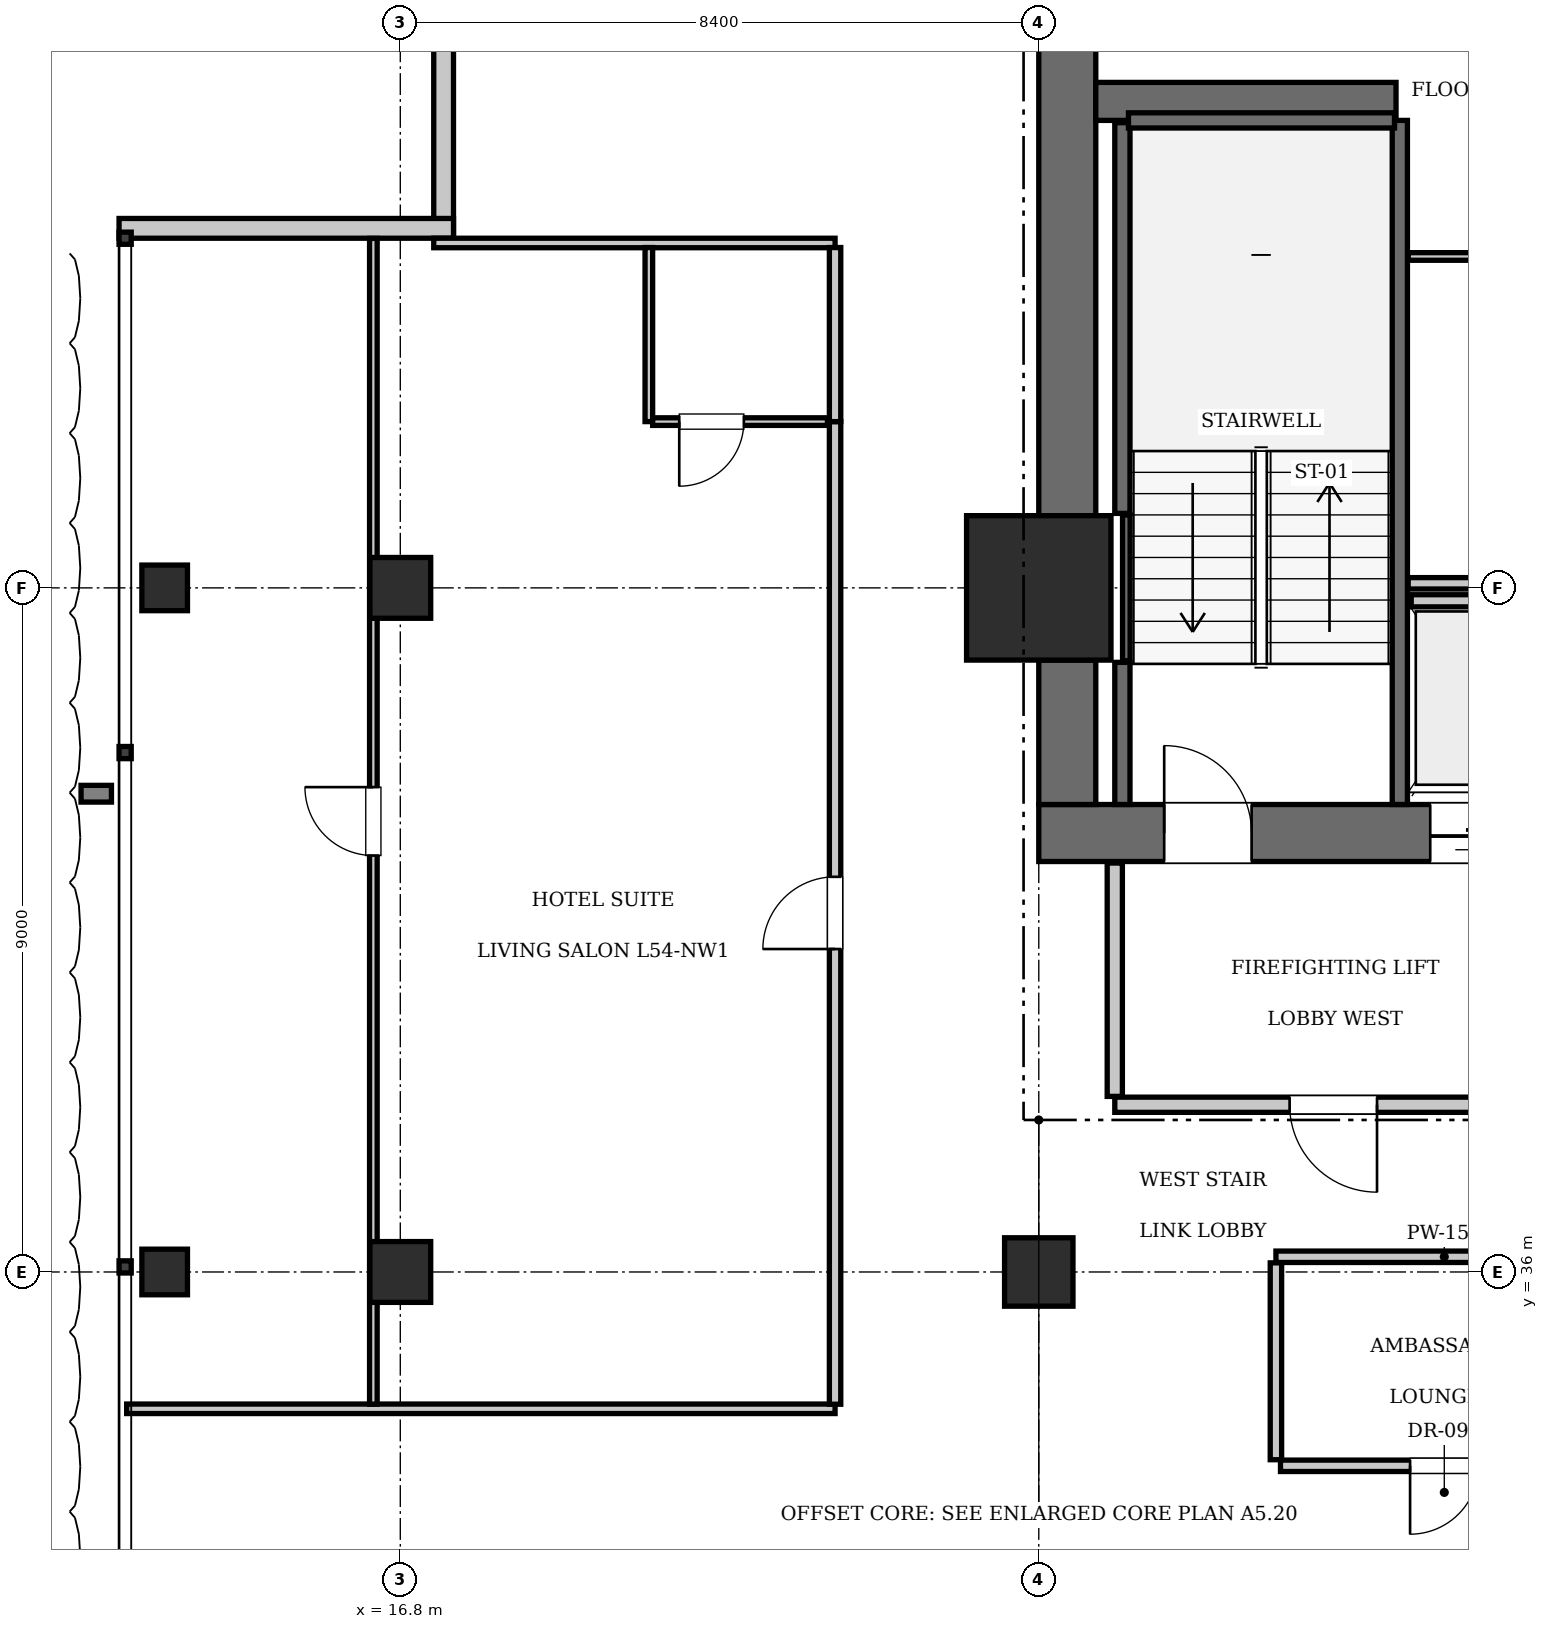
"""IFC4 building model, lengths in metres.
Left out: names, types, materials, properties, quantities, classifications, styles, units other than length and angle.
Written with IfcOpenShell. Run it as: python <this file> out.ifc"""

import sys

from ifc_helpers import new_model, si_unit, direction, frame, frame_2d, origin, origin_2d, place, context, subcontext, project, spatial, rectangle, i_section, extrude, element, fill, save


model = new_model("IFC4")
c1 = context("Model", 3, precision=1e-05, world=origin(), true_north=direction((0.0, 1.0)))
c2 = subcontext(c1, "Body", "Model", "MODEL_VIEW")
j1 = project(units=[si_unit("LENGTHUNIT", "METRE"), si_unit("PLANEANGLEUNIT", "RADIAN")], contexts=[c1])
p1 = place(None, origin())
s1 = spatial("IfcSite", under=j1, at=p1, CompositionType="ELEMENT")
p2 = place(p1, origin())
s2 = spatial("IfcBuilding", under=s1, at=p2, CompositionType="ELEMENT")
p3 = place(p2, frame((0.0, 0.0, 219.8)))
s3 = spatial("IfcBuildingStorey", under=s2, at=p3, CompositionType="ELEMENT", Elevation=219.8)
p4 = place(p3, frame((25.2, 45.0, 0.0), z_axis=(0.0, 0.0, 1.0), x_axis=(1.0, 0.0, 0.0)))
e1 = element("IfcColumn", 1, at=p4, inside=s3, PredefinedType="COLUMN", context=c2, shape_type="SweptSolid", body=[
    extrude(rectangle(XDim=1.9, YDim=1.9, at=origin_2d()), origin(), (0.0, 0.0, 1.0), 3.85),
])
p5 = place(p3, frame((25.2, 41.775, 0.0), z_axis=(0.0, 0.0, 1.0), x_axis=(1.0, 0.0, 0.0)))
e2 = element("IfcWall", 2, at=p5, inside=s3, PredefinedType="SHEAR", context=c2, shape_type="SweptSolid", body=[
    extrude(rectangle(XDim=6.8, YDim=0.75, at=frame_2d((3.4, 0.0))), origin(), (0.0, 0.0, 1.0), 3.85),
])
p6 = place(p5, frame((1.65, 0.0, 0.0)))
e3 = element("IfcOpeningElement", 3, at=p6, cuts=e2, PredefinedType="OPENING", context=c2, shape_type="SweptSolid", body=[
    extrude(rectangle(XDim=1.15, YDim=2.15, at=frame_2d((0.575, 1.075))), frame((0.0, 0.385, 0.0), z_axis=(0.0, -1.0, 0.0), x_axis=(1.0, 0.0, 0.0)), (0.0, 0.0, 1.0), 0.77),
])
p7 = place(p5, frame((5.15, 0.0, 0.0)))
e4 = element("IfcOpeningElement", 4, at=p7, cuts=e2, PredefinedType="OPENING", context=c2, shape_type="SweptSolid", body=[
    extrude(rectangle(XDim=1.1, YDim=2.2, at=frame_2d((0.55, 1.1))), frame((0.0, 0.385, 0.0), z_axis=(0.0, -1.0, 0.0), x_axis=(1.0, 0.0, 0.0)), (0.0, 0.0, 1.0), 0.77),
])
p8 = place(p3, frame((25.575, 42.15, 0.0), z_axis=(0.0, 0.0, 1.0), x_axis=(0.0, 1.0, 0.0)))
e5 = element("IfcWall", 5, at=p8, inside=s3, PredefinedType="SHEAR", context=c2, shape_type="SweptSolid", body=[
    extrude(rectangle(XDim=1.9, YDim=0.75, at=frame_2d((0.95, 0.0))), origin(), (0.0, 0.0, 1.0), 3.85),
])
p9 = place(p3, frame((25.575, 45.95, 0.0), z_axis=(0.0, 0.0, 1.0), x_axis=(0.0, 1.0, 0.0)))
e6 = element("IfcWall", 6, at=p9, inside=s3, PredefinedType="SHEAR", context=c2, shape_type="SweptSolid", body=[
    extrude(rectangle(XDim=7.3, YDim=0.75, at=frame_2d((3.65, 0.0))), origin(), (0.0, 0.0, 1.0), 3.85),
])
p10 = place(p3, frame((25.95, 51.4, 0.0), z_axis=(0.0, 0.0, 1.0), x_axis=(1.0, 0.0, 0.0)))
e7 = element("IfcWall", 7, at=p10, inside=s3, PredefinedType="SHEAR", context=c2, shape_type="SweptSolid", body=[
    extrude(rectangle(XDim=3.95, YDim=0.5, at=frame_2d((1.975, 0.0))), origin(), (0.0, 0.0, 1.0), 3.85),
])
p11 = place(p3, frame((25.2, 36.0, 0.0), z_axis=(0.0, 0.0, 1.0), x_axis=(1.0, 0.0, 0.0)))
e8 = element("IfcColumn", 8, at=p11, inside=s3, PredefinedType="COLUMN", context=c2, shape_type="SweptSolid", body=[
    extrude(rectangle(XDim=0.9, YDim=0.9, at=origin_2d()), origin(), (0.0, 0.0, 1.0), 3.85),
])
for number, where, z_axis, x_axis in (
    (9, (16.8, 36.0, 0.0), (0.0, 0.0, 1.0), (1.0, 0.0, 0.0)),
    (10, (16.8, 45.0, 0.0), (0.0, 0.0, 1.0), (1.0, 0.0, 0.0)),
):
    element("IfcColumn", number, at=place(p3, frame(where, z_axis=z_axis, x_axis=x_axis)), inside=s3, PredefinedType="COLUMN", context=c2, shape_type="SweptSolid", body=[
        extrude(rectangle(XDim=0.8, YDim=0.8, at=origin_2d()), origin(), (0.0, 0.0, 1.0), 3.85),
    ])
for number, where, z_axis, x_axis in (
    (11, (13.7, 36.0, 0.0), (0.0, 0.0, 1.0), (1.0, 0.0, 0.0)),
    (12, (13.7, 45.0, 0.0), (0.0, 0.0, 1.0), (1.0, 0.0, 0.0)),
):
    element("IfcColumn", number, at=place(p3, frame(where, z_axis=z_axis, x_axis=x_axis)), inside=s3, PredefinedType="COLUMN", context=c2, shape_type="SweptSolid", body=[
        extrude(i_section(OverallWidth=0.6, OverallDepth=0.6, WebThickness=0.025, FlangeThickness=0.038, at=origin_2d()), origin(), (0.0, 0.0, 1.0), 3.85),
    ])
p12 = place(p3, frame((29.95, 42.15, 0.0), z_axis=(0.0, 0.0, 1.0), x_axis=(0.0, 1.0, 0.0)))
e13 = element("IfcWall", 13, at=p12, inside=s3, PredefinedType="SOLIDWALL", context=c2, shape_type="SweptSolid", body=[
    extrude(rectangle(XDim=9.0, YDim=0.2, at=frame_2d((4.5, 0.0))), origin(), (0.0, 0.0, 1.0), 3.61),
])
p13 = place(p3, frame((26.3, 42.15, 0.0), z_axis=(0.0, 0.0, 1.0), x_axis=(0.0, 1.0, 0.0)))
e14 = element("IfcWall", 14, at=p13, inside=s3, PredefinedType="SOLIDWALL", context=c2, shape_type="SweptSolid", body=[
    extrude(rectangle(XDim=1.87, YDim=0.2, at=frame_2d((0.935, 0.0))), origin(), (0.0, 0.0, 1.0), 3.61),
])
p14 = place(p3, frame((26.3, 45.98, 0.0), z_axis=(0.0, 0.0, 1.0), x_axis=(0.0, 1.0, 0.0)))
e15 = element("IfcWall", 15, at=p14, inside=s3, PredefinedType="SOLIDWALL", context=c2, shape_type="SweptSolid", body=[
    extrude(rectangle(XDim=5.14, YDim=0.2, at=frame_2d((2.57, 0.0))), origin(), (0.0, 0.0, 1.0), 3.61),
])
p15 = place(p3, frame((26.38, 51.15, 0.0), z_axis=(0.0, 0.0, 1.0), x_axis=(1.0, 0.0, 0.0)))
e16 = element("IfcWall", 16, at=p15, inside=s3, PredefinedType="SOLIDWALL", context=c2, shape_type="SweptSolid", body=[
    extrude(rectangle(XDim=3.5, YDim=0.2, at=frame_2d((1.75, 0.0))), origin(), (0.0, 0.0, 1.0), 3.61),
])
p16 = place(p3, frame((26.352, 44.04, 0.0), z_axis=(0.0, 0.0, 1.0), x_axis=(0.0, 1.0, 0.0)))
e17 = element("IfcWall", 17, at=p16, inside=s3, PredefinedType="SOLIDWALL", context=c2, shape_type="SweptSolid", body=[
    extrude(rectangle(XDim=1.92, YDim=0.1, at=frame_2d((0.96, 0.0))), origin(), (0.0, 0.0, 1.0), 3.61),
])
p17 = place(p3, frame((30.1, 44.83, 0.0), z_axis=(0.0, 0.0, 1.0), x_axis=(1.0, 0.0, 0.0)))
e18 = element("IfcWall", 18, at=p17, inside=s3, PredefinedType="SOLIDWALL", context=c2, shape_type="SweptSolid", body=[
    extrude(rectangle(XDim=1.6, YDim=0.16, at=frame_2d((0.8, 0.0))), origin(), (0.0, 0.0, 1.0), 3.61),
])
for number, where, z_axis, x_axis in (
    (19, (17.37, 49.6, 0.0), (0.0, 0.0, 1.0), (0.0, 1.0, 0.0)),
    (20, (13.1, 49.73, 0.0), (0.0, 0.0, 1.0), (1.0, 0.0, 0.0)),
):
    element("IfcWall", number, at=place(p3, frame(where, z_axis=z_axis, x_axis=x_axis)), inside=s3, PredefinedType="SOLIDWALL", context=c2, shape_type="SweptSolid", body=[
        extrude(rectangle(XDim=4.4, YDim=0.26, at=frame_2d((2.2, 0.0))), origin(), (0.0, 0.0, 1.0), 3.61),
    ])
p18 = place(p3, frame((26.2, 38.2, 0.0), z_axis=(0.0, 0.0, 1.0), x_axis=(1.0, 0.0, 0.0)))
e21 = element("IfcWall", 21, at=p18, inside=s3, PredefinedType="PARTITIONING", context=c2, shape_type="SweptSolid", body=[
    extrude(rectangle(XDim=5.8, YDim=0.2, at=frame_2d((2.9, 0.0))), origin(), (0.0, 0.0, 1.0), 3.61),
])
p19 = place(p18, frame((2.3, 0.0, 0.0)))
e22 = element("IfcOpeningElement", 22, at=p19, cuts=e21, PredefinedType="OPENING", context=c2, shape_type="SweptSolid", body=[
    extrude(rectangle(XDim=1.15, YDim=2.15, at=frame_2d((0.575, 1.075))), frame((0.0, 0.11, 0.0), z_axis=(0.0, -1.0, 0.0), x_axis=(1.0, 0.0, 0.0)), (0.0, 0.0, 1.0), 0.22),
])
p20 = place(p3, frame((26.2, 38.31, 0.0), z_axis=(0.0, 0.0, 1.0), x_axis=(0.0, 1.0, 0.0)))
e23 = element("IfcWall", 23, at=p20, inside=s3, PredefinedType="PARTITIONING", context=c2, shape_type="SweptSolid", body=[
    extrude(rectangle(XDim=3.07, YDim=0.2, at=frame_2d((1.535, 0.0))), origin(), (0.0, 0.0, 1.0), 3.61),
])
p21 = place(p3, frame((30.06, 45.06, 0.0), z_axis=(0.0, 0.0, 1.0), x_axis=(1.0, 0.0, 0.0)))
e24 = element("IfcWall", 24, at=p21, inside=s3, PredefinedType="PARTITIONING", context=c2, shape_type="SweptSolid", body=[
    extrude(rectangle(XDim=3.18, YDim=0.15, at=frame_2d((1.59, 0.0))), origin(), (0.0, 0.0, 1.0), 3.61),
])
p22 = place(p3, frame((30.06, 49.36, 0.0), z_axis=(0.0, 0.0, 1.0), x_axis=(1.0, 0.0, 0.0)))
e25 = element("IfcWall", 25, at=p22, inside=s3, PredefinedType="PARTITIONING", context=c2, shape_type="SweptSolid", body=[
    extrude(rectangle(XDim=3.18, YDim=0.1, at=frame_2d((1.59, 0.0))), origin(), (0.0, 0.0, 1.0), 3.61),
])
p23 = place(p22, frame((1.95, 0.0, 0.0)))
e26 = element("IfcOpeningElement", 26, at=p23, cuts=e25, PredefinedType="OPENING", context=c2, shape_type="SweptSolid", body=[
    extrude(rectangle(XDim=0.8, YDim=2.05, at=frame_2d((0.4, 1.025))), frame((0.0, 0.06, 0.0), z_axis=(0.0, -1.0, 0.0), x_axis=(1.0, 0.0, 0.0)), (0.0, 0.0, 1.0), 0.12),
])
p24 = place(p3, frame((28.32, 36.2, 0.0), z_axis=(0.0, 0.0, 1.0), x_axis=(1.0, 0.0, 0.0)))
e27 = element("IfcWall", 27, at=p24, inside=s3, PredefinedType="PARTITIONING", context=c2, shape_type="SweptSolid", body=[
    extrude(rectangle(XDim=4.43, YDim=0.15, at=frame_2d((2.215, 0.0))), origin(), (0.0, 0.0, 1.0), 3.61),
])
p25 = place(p3, frame((28.32, 33.53, 0.0), z_axis=(0.0, 0.0, 1.0), x_axis=(0.0, 1.0, 0.0)))
e28 = element("IfcWall", 28, at=p25, inside=s3, PredefinedType="PARTITIONING", context=c2, shape_type="SweptSolid", body=[
    extrude(rectangle(XDim=2.59, YDim=0.15, at=frame_2d((1.295, 0.0))), origin(), (0.0, 0.0, 1.0), 3.61),
])
p26 = place(p3, frame((28.38, 33.45, 0.0), z_axis=(0.0, 0.0, 1.0), x_axis=(1.0, 0.0, 0.0)))
e29 = element("IfcWall", 29, at=p26, inside=s3, PredefinedType="PARTITIONING", context=c2, shape_type="SweptSolid", body=[
    extrude(rectangle(XDim=4.31, YDim=0.15, at=frame_2d((2.155, 0.0))), origin(), (0.0, 0.0, 1.0), 3.61),
])
p27 = place(p26, frame((1.705, 0.0, 0.0)))
e30 = element("IfcOpeningElement", 30, at=p27, cuts=e29, PredefinedType="OPENING", context=c2, shape_type="SweptSolid", body=[
    extrude(rectangle(XDim=0.9, YDim=2.1, at=frame_2d((0.45, 1.05))), frame((0.0, 0.085, 0.0), z_axis=(0.0, -1.0, 0.0), x_axis=(1.0, 0.0, 0.0)), (0.0, 0.0, 1.0), 0.17),
])
p28 = place(p3, frame((13.2, 34.2, 0.0), z_axis=(0.0, 0.0, 1.0), x_axis=(1.0, 0.0, 0.0)))
e31 = element("IfcWall", 31, at=p28, inside=s3, PredefinedType="PARTITIONING", context=c2, shape_type="SweptSolid", body=[
    extrude(rectangle(XDim=9.32, YDim=0.125, at=frame_2d((4.66, 0.0))), origin(), (0.0, 0.0, 1.0), 3.61),
])
p29 = place(p3, frame((17.24, 49.538, 0.0), z_axis=(0.0, 0.0, 1.0), x_axis=(1.0, 0.0, 0.0)))
e32 = element("IfcWall", 32, at=p29, inside=s3, PredefinedType="PARTITIONING", context=c2, shape_type="SweptSolid", body=[
    extrude(rectangle(XDim=5.28, YDim=0.125, at=frame_2d((2.64, 0.0))), origin(), (0.0, 0.0, 1.0), 3.61),
])
p30 = place(p3, frame((22.52, 34.26, 0.0), z_axis=(0.0, 0.0, 1.0), x_axis=(0.0, 1.0, 0.0)))
e33 = element("IfcWall", 33, at=p30, inside=s3, PredefinedType="PARTITIONING", context=c2, shape_type="SweptSolid", body=[
    extrude(rectangle(XDim=12.927, YDim=0.15, at=frame_2d((6.464, 0.0))), origin(), (0.0, 0.0, 1.0), 3.61),
])
p31 = place(p30, frame((5.989, 0.0, 0.0)))
e34 = element("IfcOpeningElement", 34, at=p31, cuts=e33, PredefinedType="OPENING", context=c2, shape_type="SweptSolid", body=[
    extrude(rectangle(XDim=0.95, YDim=2.15, at=frame_2d((0.475, 1.075))), frame((0.0, 0.085, 0.0), z_axis=(0.0, -1.0, 0.0), x_axis=(1.0, 0.0, 0.0)), (0.0, 0.0, 1.0), 0.17),
])
p32 = place(p3, frame((22.52, 47.188, 0.0), z_axis=(0.0, 0.0, 1.0), x_axis=(0.0, 1.0, 0.0)))
e35 = element("IfcWall", 35, at=p32, inside=s3, PredefinedType="PARTITIONING", context=c2, shape_type="SweptSolid", body=[
    extrude(rectangle(XDim=2.29, YDim=0.15, at=frame_2d((1.145, 0.0))), origin(), (0.0, 0.0, 1.0), 3.61),
])
p33 = place(p3, frame((20.07, 47.188, 0.0), z_axis=(0.0, 0.0, 1.0), x_axis=(0.0, 1.0, 0.0)))
e36 = element("IfcWall", 36, at=p33, inside=s3, PredefinedType="PARTITIONING", context=c2, shape_type="SweptSolid", body=[
    extrude(rectangle(XDim=2.29, YDim=0.1, at=frame_2d((1.145, 0.0))), origin(), (0.0, 0.0, 1.0), 3.61),
])
p34 = place(p3, frame((20.12, 47.188, 0.0), z_axis=(0.0, 0.0, 1.0), x_axis=(1.0, 0.0, 0.0)))
e37 = element("IfcWall", 37, at=p34, inside=s3, PredefinedType="PARTITIONING", context=c2, shape_type="SweptSolid", body=[
    extrude(rectangle(XDim=2.3, YDim=0.1, at=frame_2d((1.15, 0.0))), origin(), (0.0, 0.0, 1.0), 3.61),
])
p35 = place(p34, frame((0.35, 0.0, 0.0)))
e38 = element("IfcOpeningElement", 38, at=p35, cuts=e37, PredefinedType="OPENING", context=c2, shape_type="SweptSolid", body=[
    extrude(rectangle(XDim=0.85, YDim=2.1, at=frame_2d((0.425, 1.05))), frame((0.0, 0.06, 0.0), z_axis=(0.0, -1.0, 0.0), x_axis=(1.0, 0.0, 0.0)), (0.0, 0.0, 1.0), 0.12),
])
p36 = place(p3, frame((16.446, 34.26, 0.0), z_axis=(0.0, 0.0, 1.0), x_axis=(0.0, 1.0, 0.0)))
e39 = element("IfcWall", 39, at=p36, inside=s3, PredefinedType="PARTITIONING", context=c2, shape_type="SweptSolid", body=[
    extrude(rectangle(XDim=15.337, YDim=0.1, at=frame_2d((7.669, 0.0))), origin(), (0.0, 0.0, 1.0), 3.61),
])
p37 = place(p36, frame((7.219, 0.0, 0.0)))
e40 = element("IfcOpeningElement", 40, at=p37, cuts=e39, PredefinedType="OPENING", context=c2, shape_type="SweptSolid", body=[
    extrude(rectangle(XDim=0.9, YDim=2.1, at=frame_2d((0.45, 1.05))), frame((0.0, 0.06, 0.0), z_axis=(0.0, -1.0, 0.0), x_axis=(1.0, 0.0, 0.0)), (0.0, 0.0, 1.0), 0.12),
])
p38 = place(p6, origin())
e41 = element("IfcDoor", 41, at=p38, inside=s3, OperationType="SINGLE_SWING_LEFT", PredefinedType="DOOR", context=c2, shape_type="SweptSolid", body=[
    extrude(rectangle(XDim=1.15, YDim=2.15, at=frame_2d((0.575, 1.075))), frame((0.0, 0.025, 0.0), z_axis=(0.0, -1.0, 0.0), x_axis=(1.0, 0.0, 0.0)), (0.0, 0.0, 1.0), 0.05),
])
fill(e3, e41)
p39 = place(p7, frame((1.1, 0.0, 0.0), z_axis=(0.0, 0.0, 1.0), x_axis=(-1.0, 0.0, 0.0)))
e42 = element("IfcDoor", 42, at=p39, inside=s3, OperationType="SLIDING_TO_LEFT", PredefinedType="DOOR", context=c2, shape_type="SweptSolid", body=[
    extrude(rectangle(XDim=1.1, YDim=2.2, at=frame_2d((0.55, 1.1))), frame((0.0, 0.025, 0.0), z_axis=(0.0, -1.0, 0.0), x_axis=(1.0, 0.0, 0.0)), (0.0, 0.0, 1.0), 0.05),
])
fill(e4, e42)
p40 = place(p19, frame((1.15, 0.0, 0.0), z_axis=(0.0, 0.0, 1.0), x_axis=(-1.0, 0.0, 0.0)))
e43 = element("IfcDoor", 43, at=p40, inside=s3, OperationType="SINGLE_SWING_LEFT", PredefinedType="DOOR", context=c2, shape_type="SweptSolid", body=[
    extrude(rectangle(XDim=1.15, YDim=2.15, at=frame_2d((0.575, 1.075))), frame((0.0, 0.025, 0.0), z_axis=(0.0, -1.0, 0.0), x_axis=(1.0, 0.0, 0.0)), (0.0, 0.0, 1.0), 0.05),
])
fill(e22, e43)
p41 = place(p27, frame((0.9, 0.0, 0.0), z_axis=(0.0, 0.0, 1.0), x_axis=(-1.0, 0.0, 0.0)))
e44 = element("IfcDoor", 44, at=p41, inside=s3, OperationType="SINGLE_SWING_RIGHT", PredefinedType="DOOR", context=c2, shape_type="SweptSolid", body=[
    extrude(rectangle(XDim=0.9, YDim=2.1, at=frame_2d((0.45, 1.05))), frame((0.0, 0.025, 0.0), z_axis=(0.0, -1.0, 0.0), x_axis=(1.0, 0.0, 0.0)), (0.0, 0.0, 1.0), 0.05),
])
fill(e30, e44)
p42 = place(p35, frame((0.85, 0.0, 0.0), z_axis=(0.0, 0.0, 1.0), x_axis=(-1.0, 0.0, 0.0)))
e45 = element("IfcDoor", 45, at=p42, inside=s3, OperationType="SINGLE_SWING_RIGHT", PredefinedType="DOOR", context=c2, shape_type="SweptSolid", body=[
    extrude(rectangle(XDim=0.85, YDim=2.1, at=frame_2d((0.425, 1.05))), frame((0.0, 0.025, 0.0), z_axis=(0.0, -1.0, 0.0), x_axis=(1.0, 0.0, 0.0)), (0.0, 0.0, 1.0), 0.05),
])
fill(e38, e45)
p43 = place(p31, origin())
e46 = element("IfcDoor", 46, at=p43, inside=s3, OperationType="SINGLE_SWING_LEFT", PredefinedType="DOOR", context=c2, shape_type="SweptSolid", body=[
    extrude(rectangle(XDim=0.95, YDim=2.15, at=frame_2d((0.475, 1.075))), frame((0.0, 0.025, 0.0), z_axis=(0.0, -1.0, 0.0), x_axis=(1.0, 0.0, 0.0)), (0.0, 0.0, 1.0), 0.05),
])
fill(e34, e46)
p44 = place(p37, origin())
e47 = element("IfcDoor", 47, at=p44, inside=s3, OperationType="SINGLE_SWING_RIGHT", PredefinedType="DOOR", context=c2, shape_type="SweptSolid", body=[
    extrude(rectangle(XDim=0.9, YDim=2.1, at=frame_2d((0.45, 1.05))), frame((0.0, 0.025, 0.0), z_axis=(0.0, -1.0, 0.0), x_axis=(1.0, 0.0, 0.0)), (0.0, 0.0, 1.0), 0.05),
])
fill(e40, e47)
save(model, sys.argv[1])
